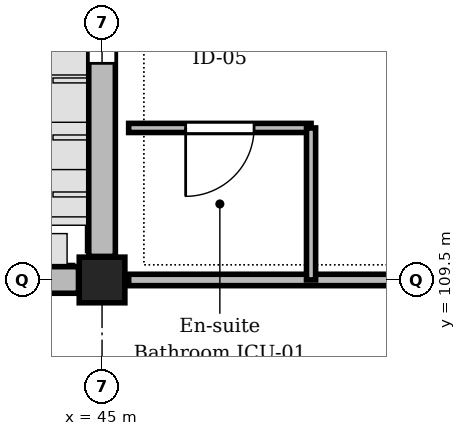
"""IFC4 building model, lengths in metres.
Left out: names, types, materials, properties, quantities, classifications, styles, units other than length and angle.
Written with IfcOpenShell. Run it as: python <this file> out.ifc"""

import sys

from ifc_helpers import new_model, si_unit, direction, frame, frame_2d, origin, origin_2d, place, context, subcontext, project, spatial, rectangle, extrude, element, fill, save


model = new_model("IFC4")
c1 = context("Model", 3, precision=1e-05, world=origin(), true_north=direction((0.0, 1.0)))
c2 = subcontext(c1, "Body", "Model", "MODEL_VIEW")
j1 = project(units=[si_unit("LENGTHUNIT", "METRE"), si_unit("PLANEANGLEUNIT", "RADIAN")], contexts=[c1])
p1 = place(None, origin())
s1 = spatial("IfcSite", under=j1, at=p1, CompositionType="ELEMENT")
p2 = place(p1, origin())
s2 = spatial("IfcBuilding", under=s1, at=p2, CompositionType="ELEMENT")
p3 = place(p2, frame((0.0, 0.0, 9.3)))
s3 = spatial("IfcBuildingStorey", under=s2, at=p3, CompositionType="ELEMENT", Elevation=9.3)
p4 = place(p3, frame((45.0, 109.5, 0.0), z_axis=(0.0, 0.0, 1.0), x_axis=(1.0, 0.0, 0.0)))
e1 = element("IfcColumn", 1, at=p4, inside=s3, PredefinedType="COLUMN", context=c2, shape_type="SweptSolid", body=[
    extrude(rectangle(XDim=0.6, YDim=0.6, at=origin_2d()), origin(), (0.0, 0.0, 1.0), 4.8),
])
p5 = place(p3, frame((37.81, 109.5, 0.0), z_axis=(0.0, 0.0, 1.0), x_axis=(1.0, 0.0, 0.0)))
e2 = element("IfcWall", 2, at=p5, inside=s3, PredefinedType="STANDARD", context=c2, shape_type="SweptSolid", body=[
    extrude(rectangle(XDim=6.88, YDim=0.35, at=frame_2d((3.44, 0.0))), origin(), (0.0, 0.0, 1.0), 3.95),
])
p6 = place(p5, frame((2.64, 0.0, 0.9)))
e3 = element("IfcOpeningElement", 3, at=p6, cuts=e2, PredefinedType="OPENING", context=c2, shape_type="SweptSolid", body=[
    extrude(rectangle(XDim=1.6, YDim=1.95, at=frame_2d((0.8, 0.975))), frame((0.0, 0.185, 0.0), z_axis=(0.0, -1.0, 0.0), x_axis=(1.0, 0.0, 0.0)), (0.0, 0.0, 1.0), 0.37),
])
p7 = place(p3, frame((45.0, 109.81, 0.0), z_axis=(0.0, 0.0, 1.0), x_axis=(0.0, 1.0, 0.0)))
e4 = element("IfcWall", 4, at=p7, inside=s3, PredefinedType="STANDARD", context=c2, shape_type="SweptSolid", body=[
    extrude(rectangle(XDim=6.88, YDim=0.35, at=frame_2d((3.44, 0.0))), origin(), (0.0, 0.0, 1.0), 3.95),
])
p8 = place(p7, frame((2.54, 0.0, 0.9)))
e5 = element("IfcOpeningElement", 5, at=p8, cuts=e4, PredefinedType="OPENING", context=c2, shape_type="SweptSolid", body=[
    extrude(rectangle(XDim=1.8, YDim=1.95, at=frame_2d((0.9, 0.975))), frame((0.0, 0.185, 0.0), z_axis=(0.0, -1.0, 0.0), x_axis=(1.0, 0.0, 0.0)), (0.0, 0.0, 1.0), 0.37),
])
p9 = place(p3, frame((45.35, 109.5, 0.0), z_axis=(0.0, 0.0, 1.0), x_axis=(1.0, 0.0, 0.0)))
e6 = element("IfcWall", 6, at=p9, inside=s3, PredefinedType="PARTITIONING", context=c2, shape_type="SweptSolid", body=[
    extrude(rectangle(XDim=14.35, YDim=0.15, at=frame_2d((7.175, 0.0))), origin(), (0.0, 0.0, 1.0), 3.985),
])
p10 = place(p9, frame((10.09, 0.0, 0.0)))
e7 = element("IfcOpeningElement", 7, at=p10, cuts=e6, PredefinedType="OPENING", context=c2, shape_type="SweptSolid", body=[
    extrude(rectangle(XDim=1.55, YDim=2.35, at=frame_2d((0.775, 1.175))), frame((0.0, 0.085, 0.0), z_axis=(0.0, -1.0, 0.0), x_axis=(1.0, 0.0, 0.0)), (0.0, 0.0, 1.0), 0.17),
])
p11 = place(p3, frame((47.75, 111.5, 0.0), z_axis=(0.0, 0.0, 1.0), x_axis=(-1.0, 0.0, 0.0)))
e8 = element("IfcWall", 8, at=p11, inside=s3, PredefinedType="PARTITIONING", context=c2, shape_type="SweptSolid", body=[
    extrude(rectangle(XDim=2.4, YDim=0.12, at=frame_2d((1.2, 0.0))), origin(), (0.0, 0.0, 1.0), 4.535),
])
p12 = place(p11, frame((0.75, 0.0, 0.0)))
e9 = element("IfcOpeningElement", 9, at=p12, cuts=e8, PredefinedType="OPENING", context=c2, shape_type="SweptSolid", body=[
    extrude(rectangle(XDim=0.9, YDim=2.1, at=frame_2d((0.45, 1.05))), frame((0.0, 0.07, 0.0), z_axis=(0.0, -1.0, 0.0), x_axis=(1.0, 0.0, 0.0)), (0.0, 0.0, 1.0), 0.14),
])
p13 = place(p3, frame((47.75, 109.5, 0.0), z_axis=(0.0, 0.0, 1.0), x_axis=(0.0, 1.0, 0.0)))
e10 = element("IfcWall", 10, at=p13, inside=s3, PredefinedType="PARTITIONING", context=c2, shape_type="SweptSolid", body=[
    extrude(rectangle(XDim=2.0, YDim=0.12, at=frame_2d((1.0, 0.0))), origin(), (0.0, 0.0, 1.0), 4.535),
])
p14 = place(p8, origin())
e11 = element("IfcWindow", 11, at=p14, inside=s3, PartitioningType="SINGLE_PANEL", PredefinedType="WINDOW", context=c2, shape_type="SweptSolid", body=[
    extrude(rectangle(XDim=1.8, YDim=1.95, at=frame_2d((0.9, 0.975))), frame((0.0, 0.03, 0.0), z_axis=(0.0, -1.0, 0.0), x_axis=(1.0, 0.0, 0.0)), (0.0, 0.0, 1.0), 0.06),
])
fill(e5, e11)
p15 = place(p12, origin())
e12 = element("IfcDoor", 12, at=p15, inside=s3, OperationType="SINGLE_SWING_RIGHT", PredefinedType="DOOR", context=c2, shape_type="SweptSolid", body=[
    extrude(rectangle(XDim=0.9, YDim=2.1, at=frame_2d((0.45, 1.05))), frame((0.0, 0.025, 0.0), z_axis=(0.0, -1.0, 0.0), x_axis=(1.0, 0.0, 0.0)), (0.0, 0.0, 1.0), 0.05),
])
fill(e9, e12)
save(model, sys.argv[1])
